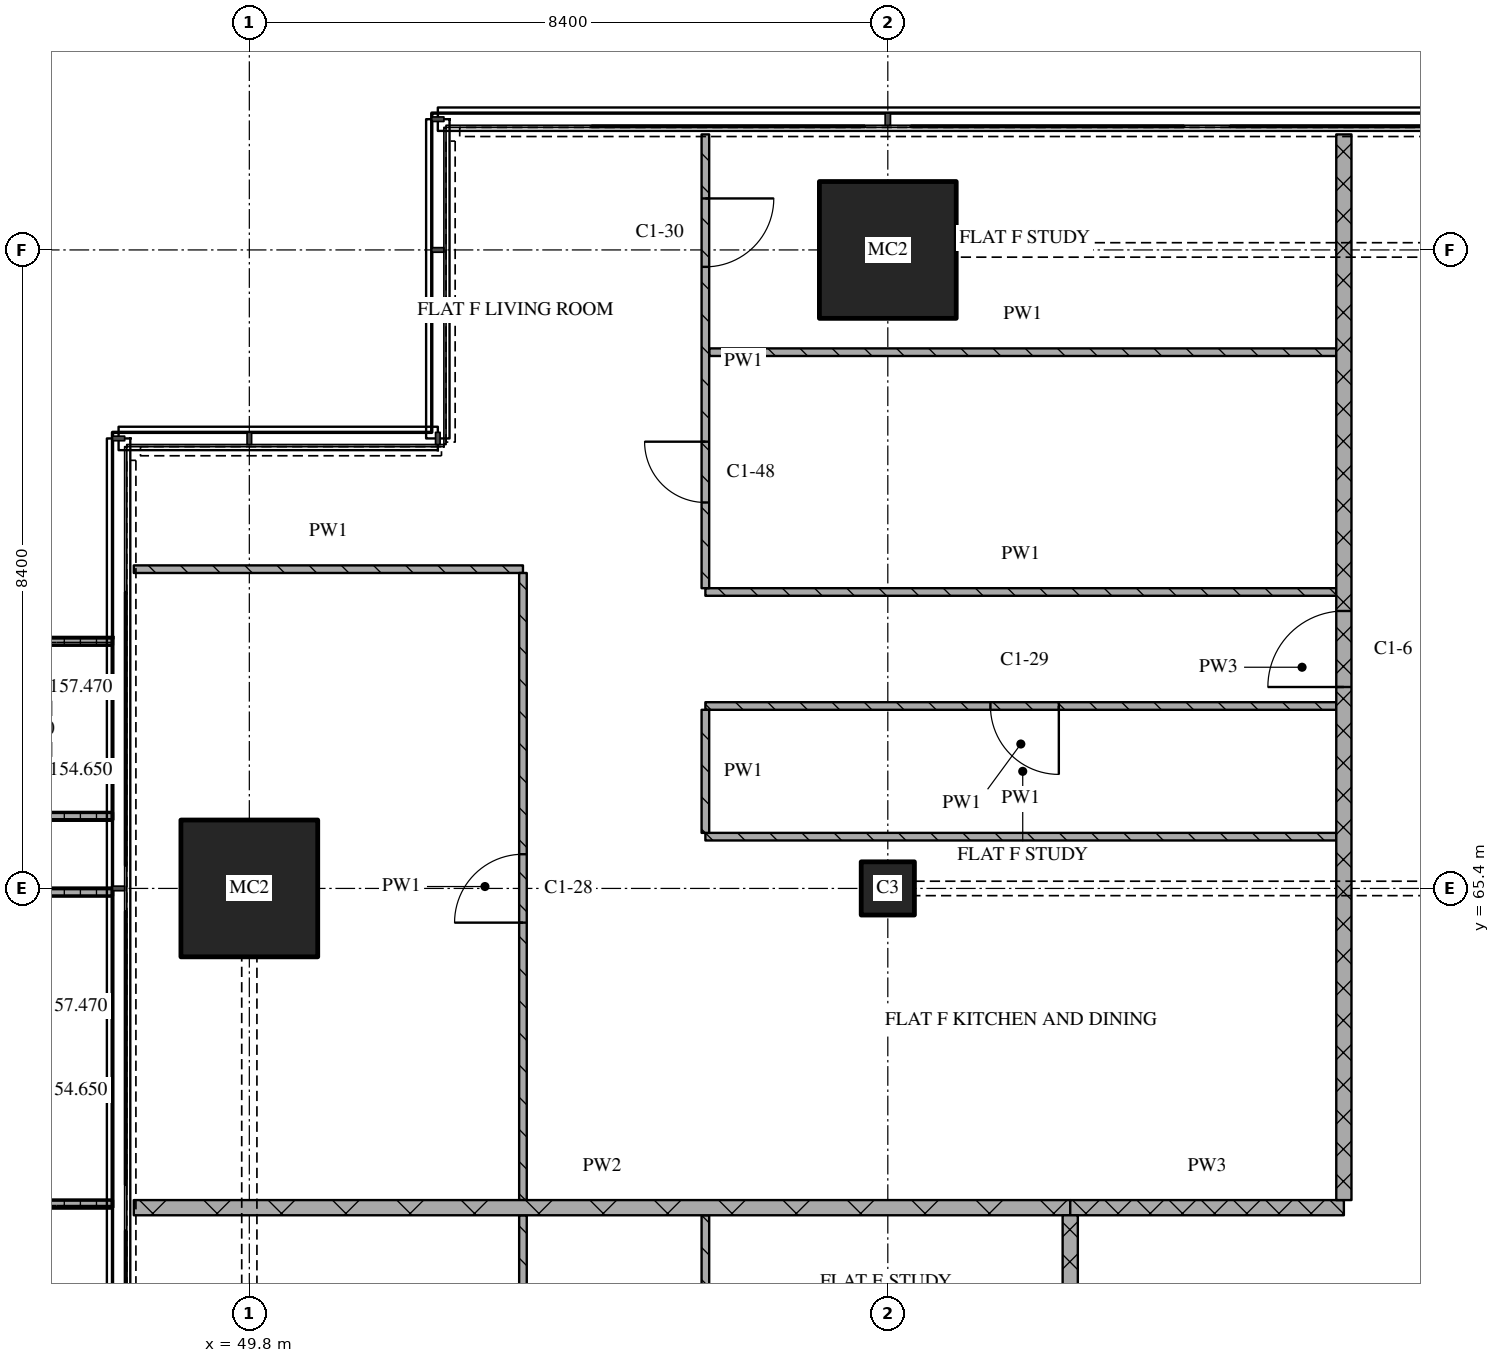
"""IFC4 building model, lengths in metres.
Left out: names, types, materials, properties, quantities, classifications, styles, units other than length and angle.
Written with IfcOpenShell. Run it as: python <this file> out.ifc"""

import sys

from ifc_helpers import new_model, si_unit, direction, frame, frame_2d, origin, origin_2d, place, context, subcontext, project, spatial, polyline, rectangle, outline, extrude, element, fill, save


model = new_model("IFC4")
c1 = context("Model", 3, precision=1e-05, world=origin(), true_north=direction((0.0, 1.0)))
c2 = subcontext(c1, "Body", "Model", "MODEL_VIEW")
j1 = project(units=[si_unit("LENGTHUNIT", "METRE"), si_unit("PLANEANGLEUNIT", "RADIAN")], contexts=[c1])
p1 = place(None, origin())
s1 = spatial("IfcSite", under=j1, at=p1, CompositionType="ELEMENT")
p2 = place(p1, origin())
s2 = spatial("IfcBuilding", under=s1, at=p2, CompositionType="ELEMENT")
p3 = place(p2, frame((0.0, 0.0, 154.65)))
s3 = spatial("IfcBuildingStorey", under=s2, at=p3, CompositionType="ELEMENT", Elevation=154.65)
p4 = place(p3, frame((49.8, 65.4, 0.0), z_axis=(0.0, 0.0, 1.0), x_axis=(1.0, 0.0, 0.0)))
e1 = element("IfcColumn", 1, at=p4, inside=s3, PredefinedType="COLUMN", context=c2, shape_type="SweptSolid", body=[
    extrude(rectangle(XDim=1.8, YDim=1.8, at=origin_2d()), origin(), (0.0, 0.0, 1.0), 3.6),
])
p5 = place(p3, frame((58.2, 65.4, 0.0), z_axis=(0.0, 0.0, 1.0), x_axis=(1.0, 0.0, 0.0)))
e2 = element("IfcColumn", 2, at=p5, inside=s3, PredefinedType="COLUMN", context=c2, shape_type="SweptSolid", body=[
    extrude(rectangle(XDim=0.7, YDim=0.7, at=origin_2d()), origin(), (0.0, 0.0, 1.0), 3.6),
])
p6 = place(p3, frame((58.2, 73.8, 0.0), z_axis=(0.0, 0.0, 1.0), x_axis=(1.0, 0.0, 0.0)))
e3 = element("IfcColumn", 3, at=p6, inside=s3, PredefinedType="COLUMN", context=c2, shape_type="SweptSolid", body=[
    extrude(rectangle(XDim=1.8, YDim=1.8, at=origin_2d()), origin(), (0.0, 0.0, 1.0), 3.6),
])
p7 = place(p3, origin())
e4 = element("IfcWall", 4, at=p7, inside=s3, PredefinedType="SOLIDWALL", context=c2, shape_type="SweptSolid", body=[
    extrude(outline(polyline([(48.0, 68.7), (48.0, 68.6), (46.5, 68.6), (46.5, 66.4), (48.0, 66.4), (48.0, 66.3), (46.4, 66.3), (46.4, 68.7), (48.0, 68.7)])), origin(), (0.0, 0.0, 1.0), 1.0),
])
p8 = place(p3, origin())
e5 = element("IfcWall", 5, at=p8, inside=s3, PredefinedType="SOLIDWALL", context=c2, shape_type="SweptSolid", body=[
    extrude(outline(polyline([(48.0, 65.4), (48.0, 65.3), (46.367, 65.3), (46.367, 61.3), (48.0, 61.3), (48.0, 61.2), (46.267, 61.2), (46.267, 65.4), (48.0, 65.4)])), origin(), (0.0, 0.0, 1.0), 1.0),
])
p9 = place(p3, frame((60.6, 61.2, 0.0), z_axis=(0.0, 0.0, 1.0), x_axis=(1.0, 0.0, 0.0)))
e6 = element("IfcWall", 6, at=p9, inside=s3, PredefinedType="PARTITIONING", context=c2, shape_type="SweptSolid", body=[
    extrude(rectangle(XDim=3.6, YDim=0.2, at=frame_2d((1.8, 0.0))), origin(), (0.0, 0.0, 1.0), 3.32),
])
p10 = place(p3, frame((48.28, 61.2, 0.0), z_axis=(0.0, 0.0, 1.0), x_axis=(1.0, 0.0, 0.0)))
e7 = element("IfcWall", 7, at=p10, inside=s3, PredefinedType="PARTITIONING", context=c2, shape_type="SweptSolid", body=[
    extrude(rectangle(XDim=12.32, YDim=0.2, at=frame_2d((6.16, 0.0))), origin(), (0.0, 0.0, 1.0), 3.32),
])
p11 = place(p3, frame((55.8, 66.081, 0.0), z_axis=(0.0, 0.0, 1.0), x_axis=(1.0, 0.0, 0.0)))
e8 = element("IfcWall", 8, at=p11, inside=s3, PredefinedType="PARTITIONING", context=c2, shape_type="SweptSolid", body=[
    extrude(rectangle(XDim=8.3, YDim=0.1, at=frame_2d((4.15, 0.0))), origin(), (0.0, 0.0, 1.0), 3.32),
])
p12 = place(p3, frame((64.1, 67.8, 0.0), z_axis=(0.0, 0.0, 1.0), x_axis=(-1.0, 0.0, 0.0)))
e9 = element("IfcWall", 9, at=p12, inside=s3, PredefinedType="PARTITIONING", context=c2, shape_type="SweptSolid", body=[
    extrude(rectangle(XDim=8.3, YDim=0.1, at=frame_2d((4.15, 0.0))), origin(), (0.0, 0.0, 1.0), 3.32),
])
p13 = place(p12, frame((3.65, 0.0, 0.0)))
e10 = element("IfcOpeningElement", 10, at=p13, cuts=e9, PredefinedType="OPENING", context=c2, shape_type="SweptSolid", body=[
    extrude(rectangle(XDim=0.9, YDim=2.1, at=frame_2d((0.45, 1.05))), frame((0.0, 0.06, 0.0), z_axis=(0.0, -1.0, 0.0), x_axis=(1.0, 0.0, 0.0)), (0.0, 0.0, 1.0), 0.12),
])
p14 = place(p3, frame((55.8, 69.3, 0.0), z_axis=(0.0, 0.0, 1.0), x_axis=(1.0, 0.0, 0.0)))
e11 = element("IfcWall", 11, at=p14, inside=s3, PredefinedType="PARTITIONING", context=c2, shape_type="SweptSolid", body=[
    extrude(rectangle(XDim=8.3, YDim=0.1, at=frame_2d((4.15, 0.0))), origin(), (0.0, 0.0, 1.0), 3.32),
])
p15 = place(p3, frame((48.28, 69.6, 0.0), z_axis=(0.0, 0.0, 1.0), x_axis=(1.0, 0.0, 0.0)))
e12 = element("IfcWall", 12, at=p15, inside=s3, PredefinedType="PARTITIONING", context=c2, shape_type="SweptSolid", body=[
    extrude(rectangle(XDim=5.12, YDim=0.1, at=frame_2d((2.56, 0.0))), origin(), (0.0, 0.0, 1.0), 3.32),
])
p16 = place(p3, frame((55.85, 72.455, 0.0), z_axis=(0.0, 0.0, 1.0), x_axis=(1.0, 0.0, 0.0)))
e13 = element("IfcWall", 13, at=p16, inside=s3, PredefinedType="PARTITIONING", context=c2, shape_type="SweptSolid", body=[
    extrude(rectangle(XDim=8.25, YDim=0.1, at=frame_2d((4.125, 0.0))), origin(), (0.0, 0.0, 1.0), 3.32),
])
p17 = place(p3, frame((55.8, 61.1, 0.0), z_axis=(0.0, 0.0, 1.0), x_axis=(0.0, -1.0, 0.0)))
e14 = element("IfcWall", 14, at=p17, inside=s3, PredefinedType="PARTITIONING", context=c2, shape_type="SweptSolid", body=[
    extrude(rectangle(XDim=2.85, YDim=0.1, at=frame_2d((1.425, 0.0))), origin(), (0.0, 0.0, 1.0), 3.32),
])
p18 = place(p17, frame((0.95, 0.0, 0.0)))
e15 = element("IfcOpeningElement", 15, at=p18, cuts=e14, PredefinedType="OPENING", context=c2, shape_type="SweptSolid", body=[
    extrude(rectangle(XDim=0.9, YDim=2.1, at=frame_2d((0.45, 1.05))), frame((0.0, 0.06, 0.0), z_axis=(0.0, -1.0, 0.0), x_axis=(1.0, 0.0, 0.0)), (0.0, 0.0, 1.0), 0.12),
])
p19 = place(p3, frame((55.8, 67.75, 0.0), z_axis=(0.0, 0.0, 1.0), x_axis=(0.0, -1.0, 0.0)))
e16 = element("IfcWall", 16, at=p19, inside=s3, PredefinedType="PARTITIONING", context=c2, shape_type="SweptSolid", body=[
    extrude(rectangle(XDim=1.619, YDim=0.1, at=frame_2d((0.81, 0.0))), origin(), (0.0, 0.0, 1.0), 3.32),
])
p20 = place(p3, frame((55.8, 75.32, 0.0), z_axis=(0.0, 0.0, 1.0), x_axis=(0.0, -1.0, 0.0)))
e17 = element("IfcWall", 17, at=p20, inside=s3, PredefinedType="PARTITIONING", context=c2, shape_type="SweptSolid", body=[
    extrude(rectangle(XDim=5.97, YDim=0.1, at=frame_2d((2.985, 0.0))), origin(), (0.0, 0.0, 1.0), 3.32),
])
p21 = place(p20, frame((0.843, 0.0, 0.0)))
e18 = element("IfcOpeningElement", 18, at=p21, cuts=e17, PredefinedType="OPENING", context=c2, shape_type="SweptSolid", body=[
    extrude(rectangle(XDim=0.9, YDim=2.1, at=frame_2d((0.45, 1.05))), frame((0.0, 0.06, 0.0), z_axis=(0.0, -1.0, 0.0), x_axis=(1.0, 0.0, 0.0)), (0.0, 0.0, 1.0), 0.12),
])
p22 = place(p20, frame((4.042, 0.0, 0.0)))
e19 = element("IfcOpeningElement", 19, at=p22, cuts=e17, PredefinedType="OPENING", context=c2, shape_type="SweptSolid", body=[
    extrude(rectangle(XDim=0.8, YDim=2.1, at=frame_2d((0.4, 1.05))), frame((0.0, 0.06, 0.0), z_axis=(0.0, -1.0, 0.0), x_axis=(1.0, 0.0, 0.0)), (0.0, 0.0, 1.0), 0.12),
])
p23 = place(p3, frame((60.6, 43.3, 0.0), z_axis=(0.0, 0.0, 1.0), x_axis=(0.0, 1.0, 0.0)))
e20 = element("IfcWall", 20, at=p23, inside=s3, PredefinedType="PARTITIONING", context=c2, shape_type="SweptSolid", body=[
    extrude(rectangle(XDim=17.8, YDim=0.2, at=frame_2d((8.9, 0.0))), origin(), (0.0, 0.0, 1.0), 3.32),
])
p24 = place(p23, frame((6.15, 0.0, 0.0)))
e21 = element("IfcOpeningElement", 21, at=p24, cuts=e20, PredefinedType="OPENING", context=c2, shape_type="SweptSolid", body=[
    extrude(rectangle(XDim=1.0, YDim=2.1, at=frame_2d((0.5, 1.05))), frame((0.0, 0.11, 0.0), z_axis=(0.0, -1.0, 0.0), x_axis=(1.0, 0.0, 0.0)), (0.0, 0.0, 1.0), 0.22),
])
p25 = place(p3, frame((64.2, 61.3, 0.0), z_axis=(0.0, 0.0, 1.0), x_axis=(0.0, 1.0, 0.0)))
e22 = element("IfcWall", 22, at=p25, inside=s3, PredefinedType="PARTITIONING", context=c2, shape_type="SweptSolid", body=[
    extrude(rectangle(XDim=14.02, YDim=0.2, at=frame_2d((7.01, 0.0))), origin(), (0.0, 0.0, 1.0), 3.32),
])
p26 = place(p25, frame((6.75, 0.0, 0.0)))
e23 = element("IfcOpeningElement", 23, at=p26, cuts=e22, PredefinedType="OPENING", context=c2, shape_type="SweptSolid", body=[
    extrude(rectangle(XDim=1.0, YDim=2.1, at=frame_2d((0.5, 1.05))), frame((0.0, 0.11, 0.0), z_axis=(0.0, -1.0, 0.0), x_axis=(1.0, 0.0, 0.0)), (0.0, 0.0, 1.0), 0.22),
])
p27 = place(p3, frame((53.4, 61.1, 0.0), z_axis=(0.0, 0.0, 1.0), x_axis=(0.0, -1.0, 0.0)))
e24 = element("IfcWall", 24, at=p27, inside=s3, PredefinedType="PARTITIONING", context=c2, shape_type="SweptSolid", body=[
    extrude(rectangle(XDim=8.25, YDim=0.1, at=frame_2d((4.125, 0.0))), origin(), (0.0, 0.0, 1.0), 3.32),
])
p28 = place(p3, frame((53.4, 61.3, 0.0), z_axis=(0.0, 0.0, 1.0), x_axis=(0.0, 1.0, 0.0)))
e25 = element("IfcWall", 25, at=p28, inside=s3, PredefinedType="PARTITIONING", context=c2, shape_type="SweptSolid", body=[
    extrude(rectangle(XDim=8.25, YDim=0.1, at=frame_2d((4.125, 0.0))), origin(), (0.0, 0.0, 1.0), 3.32),
])
p29 = place(p28, frame((3.65, 0.0, 0.0)))
e26 = element("IfcOpeningElement", 26, at=p29, cuts=e25, PredefinedType="OPENING", context=c2, shape_type="SweptSolid", body=[
    extrude(rectangle(XDim=0.9, YDim=2.1, at=frame_2d((0.45, 1.05))), frame((0.0, 0.06, 0.0), z_axis=(0.0, -1.0, 0.0), x_axis=(1.0, 0.0, 0.0)), (0.0, 0.0, 1.0), 0.12),
])
p30 = place(p13, origin())
e27 = element("IfcDoor", 27, at=p30, inside=s3, OperationType="SINGLE_SWING_LEFT", PredefinedType="DOOR", context=c2, shape_type="SweptSolid", body=[
    extrude(rectangle(XDim=0.9, YDim=2.1, at=frame_2d((0.45, 1.05))), frame((0.0, 0.025, 0.0), z_axis=(0.0, -1.0, 0.0), x_axis=(1.0, 0.0, 0.0)), (0.0, 0.0, 1.0), 0.05),
])
fill(e10, e27)
p31 = place(p21, origin())
e28 = element("IfcDoor", 28, at=p31, inside=s3, OperationType="SINGLE_SWING_LEFT", PredefinedType="DOOR", context=c2, shape_type="SweptSolid", body=[
    extrude(rectangle(XDim=0.9, YDim=2.1, at=frame_2d((0.45, 1.05))), frame((0.0, 0.025, 0.0), z_axis=(0.0, -1.0, 0.0), x_axis=(1.0, 0.0, 0.0)), (0.0, 0.0, 1.0), 0.05),
])
fill(e18, e28)
p32 = place(p22, origin())
e29 = element("IfcDoor", 29, at=p32, inside=s3, OperationType="SINGLE_SWING_RIGHT", PredefinedType="DOOR", context=c2, shape_type="SweptSolid", body=[
    extrude(rectangle(XDim=0.8, YDim=2.1, at=frame_2d((0.4, 1.05))), frame((0.0, 0.025, 0.0), z_axis=(0.0, -1.0, 0.0), x_axis=(1.0, 0.0, 0.0)), (0.0, 0.0, 1.0), 0.05),
])
fill(e19, e29)
p33 = place(p26, origin())
e30 = element("IfcDoor", 30, at=p33, inside=s3, OperationType="SINGLE_SWING_LEFT", PredefinedType="DOOR", context=c2, shape_type="SweptSolid", body=[
    extrude(rectangle(XDim=1.0, YDim=2.1, at=frame_2d((0.5, 1.05))), frame((0.0, 0.025, 0.0), z_axis=(0.0, -1.0, 0.0), x_axis=(1.0, 0.0, 0.0)), (0.0, 0.0, 1.0), 0.05),
])
fill(e23, e30)
p34 = place(p29, origin())
e31 = element("IfcDoor", 31, at=p34, inside=s3, OperationType="SINGLE_SWING_LEFT", PredefinedType="DOOR", context=c2, shape_type="SweptSolid", body=[
    extrude(rectangle(XDim=0.9, YDim=2.1, at=frame_2d((0.45, 1.05))), frame((0.0, 0.025, 0.0), z_axis=(0.0, -1.0, 0.0), x_axis=(1.0, 0.0, 0.0)), (0.0, 0.0, 1.0), 0.05),
])
fill(e26, e31)
save(model, sys.argv[1])
